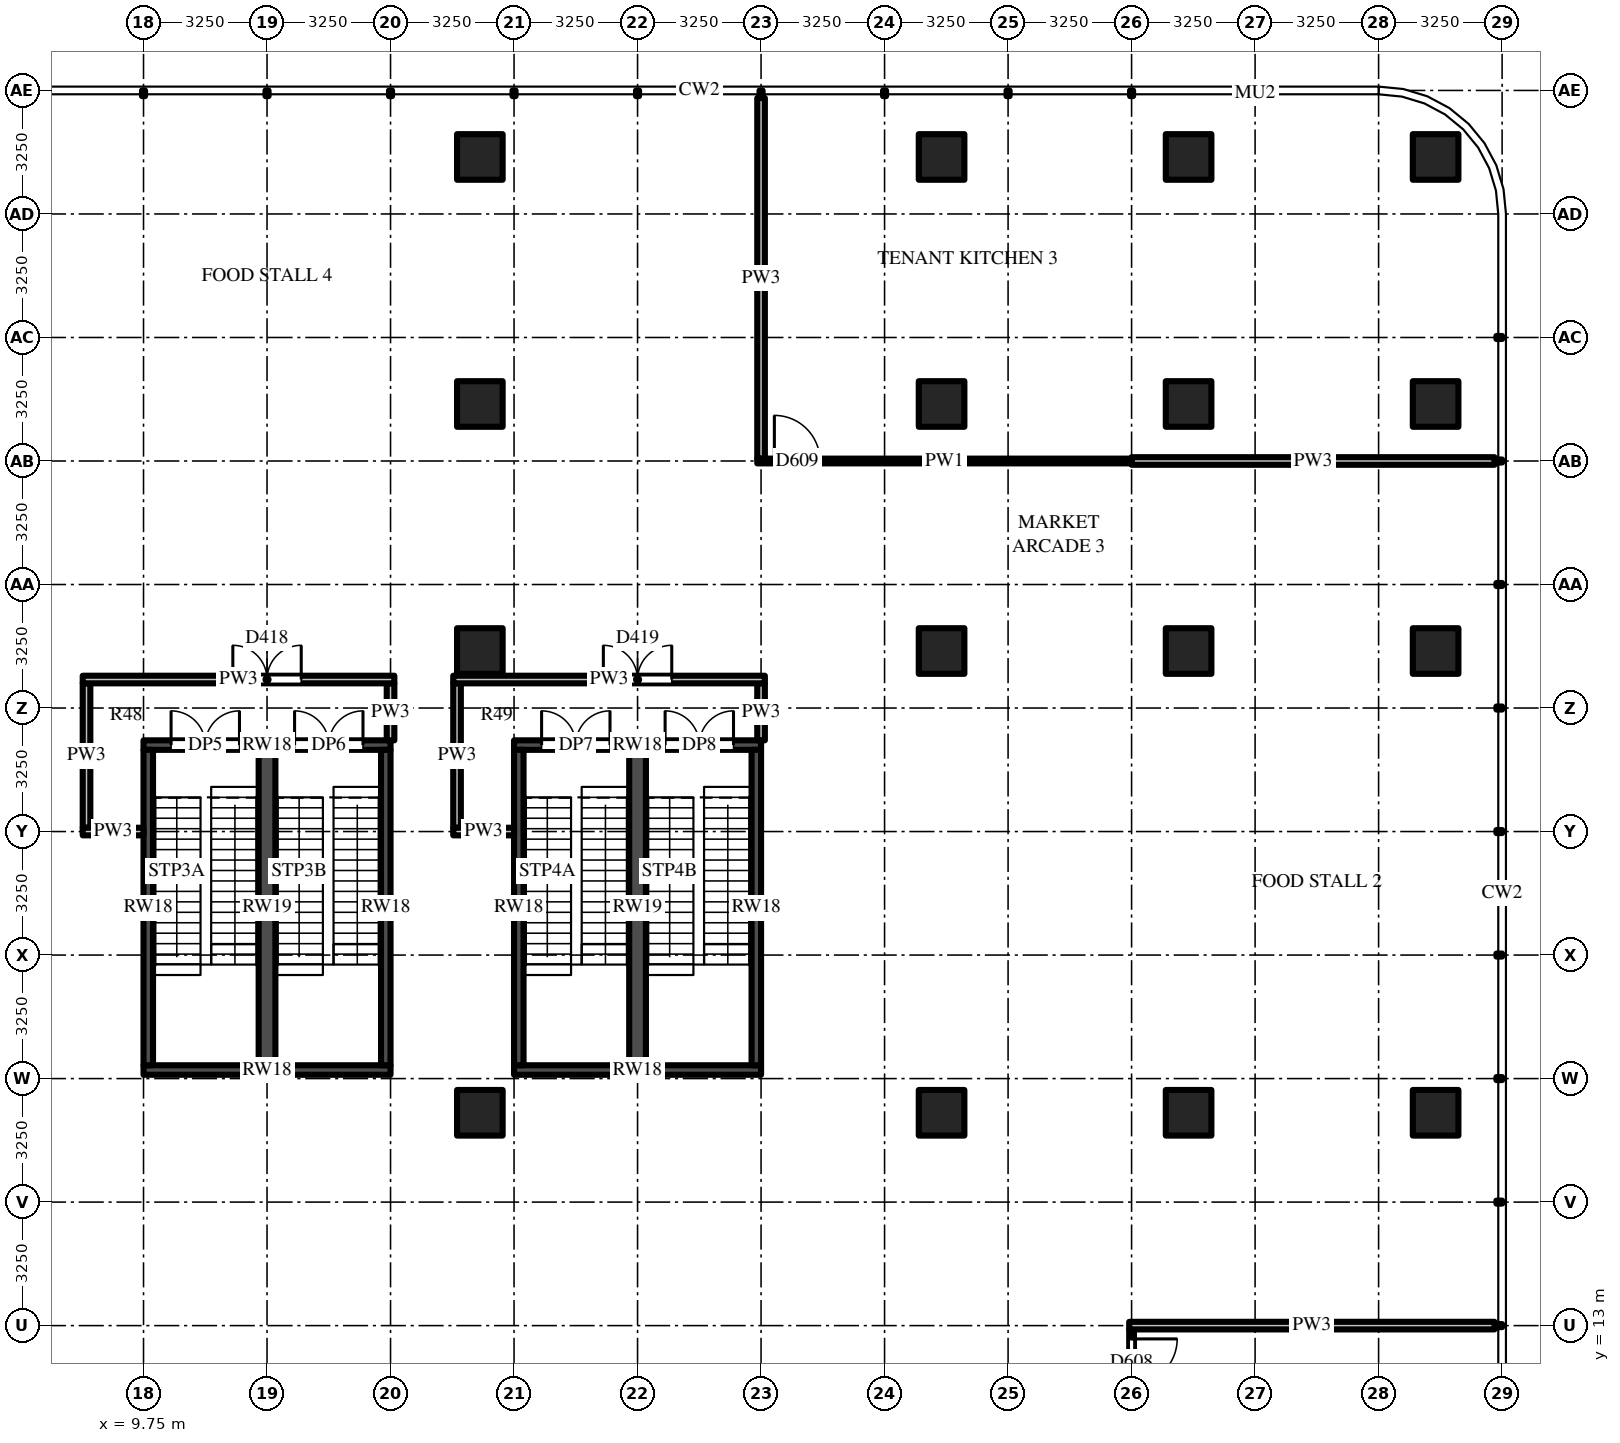
"""IFC4 building model, lengths in metres.
Left out: names, types, materials, properties, quantities, classifications, styles, units other than length and angle.
Written with IfcOpenShell. Run it as: python <this file> out.ifc"""

import sys

from ifc_helpers import new_model, si_unit, direction, frame, frame_2d, origin, origin_2d, place, context, subcontext, project, spatial, rectangle, extrude, source, transform, mapped, element, fill, save


model = new_model("IFC4")
c1 = context("Model", 3, precision=1e-05, world=origin(), true_north=direction((0.0, 1.0)))
c2 = subcontext(c1, "Body", "Model", "MODEL_VIEW")
j1 = project(units=[si_unit("LENGTHUNIT", "METRE"), si_unit("PLANEANGLEUNIT", "RADIAN")], contexts=[c1])
p1 = place(None, origin())
s1 = spatial("IfcSite", under=j1, at=p1, CompositionType="ELEMENT")
p2 = place(p1, origin())
s2 = spatial("IfcBuilding", under=s1, at=p2, CompositionType="ELEMENT")
p3 = place(p2, frame((0.0, 0.0, 8.0)))
s3 = spatial("IfcBuildingStorey", under=s2, at=p3, CompositionType="ELEMENT", Elevation=8.0)
m1 = source(origin(), c2, "Body", "SweptSolid", [
    extrude(rectangle(XDim=1.2, YDim=1.2, at=origin_2d()), origin(), (0.0, 0.0, 1.0), 6.0),
])
for number, where, z_axis, x_axis in (
    (1, (18.6, 18.6, 0.0), (0.0, 0.0, 1.0), (1.0, 0.0, 0.0)),
    (2, (18.6, 30.75, 0.0), (0.0, 0.0, 1.0), (1.0, 0.0, 0.0)),
    (3, (18.6, 37.25, 0.0), (0.0, 0.0, 1.0), (1.0, 0.0, 0.0)),
    (4, (18.6, 43.75, 0.0), (0.0, 0.0, 1.0), (1.0, 0.0, 0.0)),
    (5, (30.75, 18.6, 0.0), (0.0, 0.0, 1.0), (1.0, 0.0, 0.0)),
    (6, (30.75, 30.75, 0.0), (0.0, 0.0, 1.0), (1.0, 0.0, 0.0)),
    (7, (30.75, 37.25, 0.0), (0.0, 0.0, 1.0), (1.0, 0.0, 0.0)),
    (8, (30.75, 43.75, 0.0), (0.0, 0.0, 1.0), (1.0, 0.0, 0.0)),
    (9, (37.25, 18.6, 0.0), (0.0, 0.0, 1.0), (1.0, 0.0, 0.0)),
    (10, (37.25, 30.75, 0.0), (0.0, 0.0, 1.0), (1.0, 0.0, 0.0)),
    (11, (37.25, 37.25, 0.0), (0.0, 0.0, 1.0), (1.0, 0.0, 0.0)),
    (12, (37.25, 43.75, 0.0), (0.0, 0.0, 1.0), (1.0, 0.0, 0.0)),
    (13, (43.75, 18.6, 0.0), (0.0, 0.0, 1.0), (1.0, 0.0, 0.0)),
    (14, (43.75, 30.75, 0.0), (0.0, 0.0, 1.0), (1.0, 0.0, 0.0)),
    (15, (43.75, 37.25, 0.0), (0.0, 0.0, 1.0), (1.0, 0.0, 0.0)),
    (16, (43.75, 43.75, 0.0), (0.0, 0.0, 1.0), (1.0, 0.0, 0.0)),
):
    element("IfcColumn", number, at=place(p3, frame(where, z_axis=z_axis, x_axis=x_axis)), inside=s3, PredefinedType="COLUMN", context=c2, shape_type="MappedRepresentation", body=[
        mapped(m1, transform((0.0, 0.0, 0.0))),
    ])
m2 = source(origin(), c2, "Body", "SweptSolid", [
    extrude(rectangle(XDim=6.5, YDim=0.25, at=frame_2d((3.25, 0.0))), origin(), (0.0, 0.0, 1.0), 5.7),
])
p4 = place(p3, frame((9.75, 28.275, 0.0), z_axis=(0.0, 0.0, 1.0), x_axis=(1.0, 0.0, 0.0)))
e17 = element("IfcWall", 17, at=p4, inside=s3, PredefinedType="SHEAR", context=c2, shape_type="MappedRepresentation", body=[
    mapped(m2, transform((0.0, 0.0, 0.0))),
])
m3 = source(origin(), c2, "Body", "SweptSolid", [
    extrude(rectangle(XDim=1.8, YDim=2.1, at=frame_2d((0.9, 1.05))), frame((0.0, 0.135, 0.0), z_axis=(0.0, -1.0, 0.0), x_axis=(1.0, 0.0, 0.0)), (0.0, 0.0, 1.0), 0.27),
])
p5 = place(p4, frame((0.725, 0.0, 0.0)))
e18 = element("IfcOpeningElement", 18, at=p5, cuts=e17, PredefinedType="OPENING", context=c2, shape_type="MappedRepresentation", body=[
    mapped(m3, transform((0.0, 0.0, 0.0))),
])
p6 = place(p4, frame((3.975, 0.0, 0.0)))
e19 = element("IfcOpeningElement", 19, at=p6, cuts=e17, PredefinedType="OPENING", context=c2, shape_type="MappedRepresentation", body=[
    mapped(m3, transform((0.0, 0.0, 0.0))),
])
p7 = place(p3, frame((9.75, 19.725, 0.0), z_axis=(0.0, 0.0, 1.0), x_axis=(1.0, 0.0, 0.0)))
e20 = element("IfcWall", 20, at=p7, inside=s3, PredefinedType="SHEAR", context=c2, shape_type="MappedRepresentation", body=[
    mapped(m2, transform((0.0, 0.0, 0.0))),
])
m4 = source(origin(), c2, "Body", "SweptSolid", [
    extrude(rectangle(XDim=8.3, YDim=0.25, at=frame_2d((4.15, 0.0))), origin(), (0.0, 0.0, 1.0), 5.7),
])
for number, where, z_axis, x_axis in (
    (21, (9.875, 19.85, 0.0), (0.0, 0.0, 1.0), (0.0, 1.0, 0.0)),
    (22, (16.125, 19.85, 0.0), (0.0, 0.0, 1.0), (0.0, 1.0, 0.0)),
):
    element("IfcWall", number, at=place(p3, frame(where, z_axis=z_axis, x_axis=x_axis)), inside=s3, PredefinedType="SHEAR", context=c2, shape_type="MappedRepresentation", body=[
        mapped(m4, transform((0.0, 0.0, 0.0))),
    ])
m5 = source(origin(), c2, "Body", "SweptSolid", [
    extrude(rectangle(XDim=8.3, YDim=0.44, at=frame_2d((4.15, 0.0))), origin(), (0.0, 0.0, 1.0), 5.7),
])
p8 = place(p3, frame((13.0, 19.85, 0.0), z_axis=(0.0, 0.0, 1.0), x_axis=(0.0, 1.0, 0.0)))
e23 = element("IfcWall", 23, at=p8, inside=s3, PredefinedType="SHEAR", context=c2, shape_type="MappedRepresentation", body=[
    mapped(m5, transform((0.0, 0.0, 0.0))),
])
p9 = place(p3, frame((19.5, 28.275, 0.0), z_axis=(0.0, 0.0, 1.0), x_axis=(1.0, 0.0, 0.0)))
e24 = element("IfcWall", 24, at=p9, inside=s3, PredefinedType="SHEAR", context=c2, shape_type="MappedRepresentation", body=[
    mapped(m2, transform((0.0, 0.0, 0.0))),
])
p10 = place(p9, frame((0.725, 0.0, 0.0)))
e25 = element("IfcOpeningElement", 25, at=p10, cuts=e24, PredefinedType="OPENING", context=c2, shape_type="MappedRepresentation", body=[
    mapped(m3, transform((0.0, 0.0, 0.0))),
])
p11 = place(p9, frame((3.975, 0.0, 0.0)))
e26 = element("IfcOpeningElement", 26, at=p11, cuts=e24, PredefinedType="OPENING", context=c2, shape_type="MappedRepresentation", body=[
    mapped(m3, transform((0.0, 0.0, 0.0))),
])
p12 = place(p3, frame((19.5, 19.725, 0.0), z_axis=(0.0, 0.0, 1.0), x_axis=(1.0, 0.0, 0.0)))
e27 = element("IfcWall", 27, at=p12, inside=s3, PredefinedType="SHEAR", context=c2, shape_type="MappedRepresentation", body=[
    mapped(m2, transform((0.0, 0.0, 0.0))),
])
for number, where, z_axis, x_axis in (
    (28, (19.625, 19.85, 0.0), (0.0, 0.0, 1.0), (0.0, 1.0, 0.0)),
    (29, (25.875, 19.85, 0.0), (0.0, 0.0, 1.0), (0.0, 1.0, 0.0)),
):
    element("IfcWall", number, at=place(p3, frame(where, z_axis=z_axis, x_axis=x_axis)), inside=s3, PredefinedType="SHEAR", context=c2, shape_type="MappedRepresentation", body=[
        mapped(m4, transform((0.0, 0.0, 0.0))),
    ])
p13 = place(p3, frame((22.75, 19.85, 0.0), z_axis=(0.0, 0.0, 1.0), x_axis=(0.0, 1.0, 0.0)))
e30 = element("IfcWall", 30, at=p13, inside=s3, PredefinedType="SHEAR", context=c2, shape_type="MappedRepresentation", body=[
    mapped(m5, transform((0.0, 0.0, 0.0))),
])
m6 = source(origin(), c2, "Body", "SweptSolid", [
    extrude(rectangle(XDim=3.8, YDim=0.2, at=frame_2d((1.9, 0.0))), origin(), (0.0, 0.0, 1.0), 5.223),
])
p14 = place(p3, frame((8.25, 26.1, 0.0), z_axis=(0.0, 0.0, 1.0), x_axis=(0.0, 1.0, 0.0)))
e31 = element("IfcWall", 31, at=p14, inside=s3, PredefinedType="PARTITIONING", context=c2, shape_type="MappedRepresentation", body=[
    mapped(m6, transform((0.0, 0.0, 0.0))),
])
m7 = source(origin(), c2, "Body", "SweptSolid", [
    extrude(rectangle(XDim=1.5, YDim=0.2, at=frame_2d((0.75, 0.0))), origin(), (0.0, 0.0, 1.0), 5.7),
])
p15 = place(p3, frame((16.25, 28.4, 0.0), z_axis=(0.0, 0.0, 1.0), x_axis=(0.0, 1.0, 0.0)))
e32 = element("IfcWall", 32, at=p15, inside=s3, PredefinedType="PARTITIONING", context=c2, shape_type="MappedRepresentation", body=[
    mapped(m7, transform((0.0, 0.0, 0.0))),
])
p16 = place(p3, frame((18.0, 26.1, 0.0), z_axis=(0.0, 0.0, 1.0), x_axis=(0.0, 1.0, 0.0)))
e33 = element("IfcWall", 33, at=p16, inside=s3, PredefinedType="PARTITIONING", context=c2, shape_type="MappedRepresentation", body=[
    mapped(m6, transform((0.0, 0.0, 0.0))),
])
m8 = source(origin(), c2, "Body", "SweptSolid", [
    extrude(rectangle(XDim=9.488, YDim=0.2, at=frame_2d((4.744, 0.0))), origin(), (0.0, 0.0, 1.0), 4.839),
])
p17 = place(p3, frame((26.0, 35.812, 0.0), z_axis=(0.0, 0.0, 1.0), x_axis=(0.0, 1.0, 0.0)))
e34 = element("IfcWall", 34, at=p17, inside=s3, PredefinedType="PARTITIONING", context=c2, shape_type="MappedRepresentation", body=[
    mapped(m8, transform((0.0, 0.0, 0.0))),
])
p18 = place(p3, frame((26.0, 28.4, 0.0), z_axis=(0.0, 0.0, 1.0), x_axis=(0.0, 1.0, 0.0)))
e35 = element("IfcWall", 35, at=p18, inside=s3, PredefinedType="PARTITIONING", context=c2, shape_type="MappedRepresentation", body=[
    mapped(m7, transform((0.0, 0.0, 0.0))),
])
m9 = source(origin(), c2, "Body", "SweptSolid", [
    extrude(rectangle(XDim=9.55, YDim=0.125, at=frame_2d((4.775, 0.0))), origin(), (0.0, 0.0, 1.0), 4.997),
])
p19 = place(p3, frame((35.75, 12.9, 0.0), z_axis=(0.0, 0.0, 1.0), x_axis=(0.0, -1.0, 0.0)))
e36 = element("IfcWall", 36, at=p19, inside=s3, PredefinedType="PARTITIONING", context=c2, shape_type="MappedRepresentation", body=[
    mapped(m9, transform((0.0, 0.0, 0.0))),
])
m10 = source(origin(), c2, "Body", "SweptSolid", [
    extrude(rectangle(XDim=1.2, YDim=2.1, at=frame_2d((0.6, 1.05))), frame((0.0, 0.073, 0.0), z_axis=(0.0, -1.0, 0.0), x_axis=(1.0, 0.0, 0.0)), (0.0, 0.0, 1.0), 0.145),
])
p20 = place(p19, frame((0.25, 0.0, 0.0)))
e37 = element("IfcOpeningElement", 37, at=p20, cuts=e36, PredefinedType="OPENING", context=c2, shape_type="MappedRepresentation", body=[
    mapped(m10, transform((0.0, 0.0, 0.0))),
])
m11 = source(origin(), c2, "Body", "SweptSolid", [
    extrude(rectangle(XDim=9.613, YDim=0.2, at=frame_2d((4.806, 0.0))), origin(), (0.0, 0.0, 1.0), 4.762),
])
p21 = place(p3, frame((35.688, 13.0, 0.0), z_axis=(0.0, 0.0, 1.0), x_axis=(1.0, 0.0, 0.0)))
e38 = element("IfcWall", 38, at=p21, inside=s3, PredefinedType="PARTITIONING", context=c2, shape_type="MappedRepresentation", body=[
    mapped(m11, transform((0.0, 0.0, 0.0))),
])
m12 = source(origin(), c2, "Body", "SweptSolid", [
    extrude(rectangle(XDim=1.6, YDim=0.2, at=frame_2d((0.8, 0.0))), origin(), (0.0, 0.0, 1.0), 5.7),
])
p22 = place(p3, frame((9.75, 26.0, 0.0), z_axis=(0.0, 0.0, 1.0), x_axis=(-1.0, 0.0, 0.0)))
e39 = element("IfcWall", 39, at=p22, inside=s3, PredefinedType="PARTITIONING", context=c2, shape_type="MappedRepresentation", body=[
    mapped(m12, transform((0.0, 0.0, 0.0))),
])
m13 = source(origin(), c2, "Body", "SweptSolid", [
    extrude(rectangle(XDim=1.6, YDim=0.2, at=frame_2d((0.8, 0.0))), origin(), (0.0, 0.0, 1.0), 4.839),
])
p23 = place(p3, frame((19.5, 26.0, 0.0), z_axis=(0.0, 0.0, 1.0), x_axis=(-1.0, 0.0, 0.0)))
e40 = element("IfcWall", 40, at=p23, inside=s3, PredefinedType="PARTITIONING", context=c2, shape_type="MappedRepresentation", body=[
    mapped(m13, transform((0.0, 0.0, 0.0))),
])
m14 = source(origin(), c2, "Body", "SweptSolid", [
    extrude(rectangle(XDim=8.2, YDim=0.2, at=frame_2d((4.1, 0.0))), origin(), (0.0, 0.0, 1.0), 5.7),
])
p24 = place(p3, frame((8.15, 30.0, 0.0), z_axis=(0.0, 0.0, 1.0), x_axis=(1.0, 0.0, 0.0)))
e41 = element("IfcWall", 41, at=p24, inside=s3, PredefinedType="PARTITIONING", context=c2, shape_type="MappedRepresentation", body=[
    mapped(m14, transform((0.0, 0.0, 0.0))),
])
m15 = source(origin(), c2, "Body", "SweptSolid", [
    extrude(rectangle(XDim=1.8, YDim=2.1, at=frame_2d((0.9, 1.05))), frame((0.0, 0.11, 0.0), z_axis=(0.0, -1.0, 0.0), x_axis=(1.0, 0.0, 0.0)), (0.0, 0.0, 1.0), 0.22),
])
p25 = place(p24, frame((3.95, 0.0, 0.0)))
e42 = element("IfcOpeningElement", 42, at=p25, cuts=e41, PredefinedType="OPENING", context=c2, shape_type="MappedRepresentation", body=[
    mapped(m15, transform((0.0, 0.0, 0.0))),
])
m16 = source(origin(), c2, "Body", "SweptSolid", [
    extrude(rectangle(XDim=8.2, YDim=0.2, at=frame_2d((4.1, 0.0))), origin(), (0.0, 0.0, 1.0), 4.839),
])
p26 = place(p3, frame((17.9, 30.0, 0.0), z_axis=(0.0, 0.0, 1.0), x_axis=(1.0, 0.0, 0.0)))
e43 = element("IfcWall", 43, at=p26, inside=s3, PredefinedType="PARTITIONING", context=c2, shape_type="MappedRepresentation", body=[
    mapped(m16, transform((0.0, 0.0, 0.0))),
])
p27 = place(p26, frame((3.95, 0.0, 0.0)))
e44 = element("IfcOpeningElement", 44, at=p27, cuts=e43, PredefinedType="OPENING", context=c2, shape_type="MappedRepresentation", body=[
    mapped(m15, transform((0.0, 0.0, 0.0))),
])
m17 = source(origin(), c2, "Body", "SweptSolid", [
    extrude(rectangle(XDim=9.55, YDim=0.2, at=frame_2d((4.775, 0.0))), origin(), (0.0, 0.0, 1.0), 4.997),
])
p28 = place(p3, frame((35.75, 35.75, 0.0), z_axis=(0.0, 0.0, 1.0), x_axis=(1.0, 0.0, 0.0)))
e45 = element("IfcWall", 45, at=p28, inside=s3, PredefinedType="PARTITIONING", context=c2, shape_type="MappedRepresentation", body=[
    mapped(m17, transform((0.0, 0.0, 0.0))),
])
m18 = source(origin(), c2, "Body", "SweptSolid", [
    extrude(rectangle(XDim=9.85, YDim=0.125, at=frame_2d((4.925, 0.0))), origin(), (0.0, 0.0, 1.0), 4.997),
])
p29 = place(p3, frame((25.9, 35.75, 0.0), z_axis=(0.0, 0.0, 1.0), x_axis=(1.0, 0.0, 0.0)))
e46 = element("IfcWall", 46, at=p29, inside=s3, PredefinedType="PARTITIONING", context=c2, shape_type="MappedRepresentation", body=[
    mapped(m18, transform((0.0, 0.0, 0.0))),
])
p30 = place(p29, frame((0.45, 0.0, 0.0)))
e47 = element("IfcOpeningElement", 47, at=p30, cuts=e46, PredefinedType="OPENING", context=c2, shape_type="MappedRepresentation", body=[
    mapped(m10, transform((0.0, 0.0, 0.0))),
])
m19 = source(origin(), c2, "Body", "SweptSolid", [
    extrude(rectangle(XDim=1.8, YDim=2.1, at=frame_2d((0.9, 1.05))), frame((0.0, 0.025, 0.0), z_axis=(0.0, -1.0, 0.0), x_axis=(1.0, 0.0, 0.0)), (0.0, 0.0, 1.0), 0.05),
])
p31 = place(p5, origin())
e48 = element("IfcDoor", 48, at=p31, inside=s3, OperationType="DOUBLE_DOOR_SINGLE_SWING", PredefinedType="DOOR", context=c2, shape_type="MappedRepresentation", body=[
    mapped(m19, transform((0.0, 0.0, 0.0))),
])
fill(e18, e48)
p32 = place(p6, origin())
e49 = element("IfcDoor", 49, at=p32, inside=s3, OperationType="DOUBLE_DOOR_SINGLE_SWING", PredefinedType="DOOR", context=c2, shape_type="MappedRepresentation", body=[
    mapped(m19, transform((0.0, 0.0, 0.0))),
])
fill(e19, e49)
p33 = place(p10, origin())
e50 = element("IfcDoor", 50, at=p33, inside=s3, OperationType="DOUBLE_DOOR_SINGLE_SWING", PredefinedType="DOOR", context=c2, shape_type="MappedRepresentation", body=[
    mapped(m19, transform((0.0, 0.0, 0.0))),
])
fill(e25, e50)
p34 = place(p11, origin())
e51 = element("IfcDoor", 51, at=p34, inside=s3, OperationType="DOUBLE_DOOR_SINGLE_SWING", PredefinedType="DOOR", context=c2, shape_type="MappedRepresentation", body=[
    mapped(m19, transform((0.0, 0.0, 0.0))),
])
fill(e26, e51)
m20 = source(origin(), c2, "Body", "SweptSolid", [
    extrude(rectangle(XDim=1.2, YDim=2.1, at=frame_2d((0.6, 1.05))), frame((0.0, 0.025, 0.0), z_axis=(0.0, -1.0, 0.0), x_axis=(1.0, 0.0, 0.0)), (0.0, 0.0, 1.0), 0.05),
])
p35 = place(p20, origin())
e52 = element("IfcDoor", 52, at=p35, inside=s3, OperationType="SINGLE_SWING_LEFT", PredefinedType="DOOR", context=c2, shape_type="MappedRepresentation", body=[
    mapped(m20, transform((0.0, 0.0, 0.0))),
])
fill(e37, e52)
p36 = place(p25, origin())
e53 = element("IfcDoor", 53, at=p36, inside=s3, OperationType="DOUBLE_DOOR_SINGLE_SWING", PredefinedType="DOOR", context=c2, shape_type="MappedRepresentation", body=[
    mapped(m19, transform((0.0, 0.0, 0.0))),
])
fill(e42, e53)
p37 = place(p27, origin())
e54 = element("IfcDoor", 54, at=p37, inside=s3, OperationType="DOUBLE_DOOR_SINGLE_SWING", PredefinedType="DOOR", context=c2, shape_type="MappedRepresentation", body=[
    mapped(m19, transform((0.0, 0.0, 0.0))),
])
fill(e44, e54)
p38 = place(p30, origin())
e55 = element("IfcDoor", 55, at=p38, inside=s3, OperationType="SINGLE_SWING_LEFT", PredefinedType="DOOR", context=c2, shape_type="MappedRepresentation", body=[
    mapped(m20, transform((0.0, 0.0, 0.0))),
])
fill(e47, e55)
save(model, sys.argv[1])
